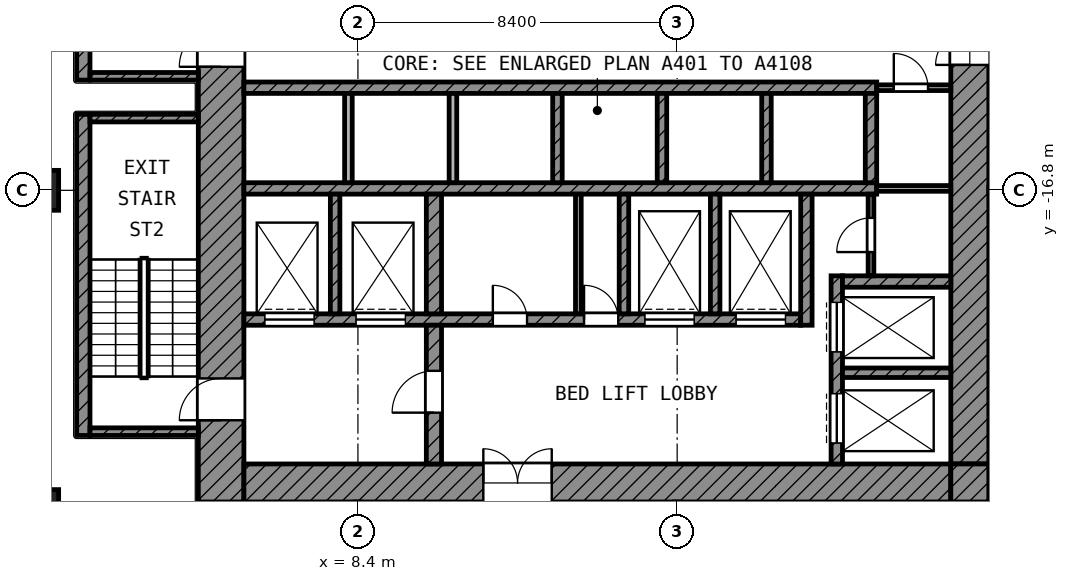
"""IFC4 building model, lengths in metres.
Left out: names, types, materials, properties, quantities, classifications, styles, units other than length and angle.
Written with IfcOpenShell. Run it as: python <this file> out.ifc"""

import sys

from ifc_helpers import new_model, si_unit, direction, frame, frame_2d, origin, origin_2d, place, context, subcontext, project, spatial, rectangle, extrude, element, fill, save


model = new_model("IFC4")
c1 = context("Model", 3, precision=1e-05, world=origin(), true_north=direction((0.0, 1.0)))
c2 = subcontext(c1, "Body", "Model", "MODEL_VIEW")
j1 = project(units=[si_unit("LENGTHUNIT", "METRE"), si_unit("PLANEANGLEUNIT", "RADIAN")], contexts=[c1])
p1 = place(None, origin())
s1 = spatial("IfcSite", under=j1, at=p1, CompositionType="ELEMENT")
p2 = place(p1, origin())
s2 = spatial("IfcBuilding", under=s1, at=p2, CompositionType="ELEMENT")
p3 = place(p2, frame((0.0, 0.0, 115.6)))
s3 = spatial("IfcBuildingStorey", under=s2, at=p3, CompositionType="ELEMENT", Elevation=115.6)
for number, where, z_axis, x_axis in (
    (1, (0.0, -16.8, 0.0), (0.0, 0.0, 1.0), (1.0, 0.0, 0.0)),
    (2, (0.0, -25.2, 0.0), (0.0, 0.0, 1.0), (1.0, 0.0, 0.0)),
):
    element("IfcColumn", number, at=place(p3, frame(where, z_axis=z_axis, x_axis=x_axis)), inside=s3, PredefinedType="COLUMN", context=c2, shape_type="SweptSolid", body=[
        extrude(rectangle(XDim=1.05, YDim=1.05, at=origin_2d()), origin(), (0.0, 0.0, 1.0), 4.2),
    ])
p4 = place(p3, frame((4.8, -25.0, 0.0), z_axis=(0.0, 0.0, 1.0), x_axis=(0.0, 1.0, 0.0)))
e3 = element("IfcWall", 3, at=p4, inside=s3, PredefinedType="SHEAR", context=c2, shape_type="SweptSolid", body=[
    extrude(rectangle(XDim=19.6, YDim=1.2, at=frame_2d((9.8, 0.0))), origin(), (0.0, 0.0, 1.0), 3.6),
])
p5 = place(p4, frame((11.45, 0.0, 0.0)))
e4 = element("IfcOpeningElement", 4, at=p5, cuts=e3, PredefinedType="OPENING", context=c2, shape_type="SweptSolid", body=[
    extrude(rectangle(XDim=1.1, YDim=2.1, at=frame_2d((0.55, 1.05))), frame((0.0, 0.61, 0.0), z_axis=(0.0, -1.0, 0.0), x_axis=(1.0, 0.0, 0.0)), (0.0, 0.0, 1.0), 1.22),
])
p6 = place(p4, frame((2.15, 0.0, 0.0)))
e5 = element("IfcOpeningElement", 5, at=p6, cuts=e3, PredefinedType="OPENING", context=c2, shape_type="SweptSolid", body=[
    extrude(rectangle(XDim=1.1, YDim=2.1, at=frame_2d((0.55, 1.05))), frame((0.0, 0.61, 0.0), z_axis=(0.0, -1.0, 0.0), x_axis=(1.0, 0.0, 0.0)), (0.0, 0.0, 1.0), 1.22),
])
p7 = place(p3, frame((24.5, -24.0, 0.0), z_axis=(0.0, 0.0, 1.0), x_axis=(0.0, 1.0, 0.0)))
e6 = element("IfcWall", 6, at=p7, inside=s3, PredefinedType="SHEAR", context=c2, shape_type="SweptSolid", body=[
    extrude(rectangle(XDim=18.6, YDim=1.0, at=frame_2d((9.3, 0.0))), origin(), (0.0, 0.0, 1.0), 3.6),
])
p8 = place(p7, frame((10.5, 0.0, 0.0)))
e7 = element("IfcOpeningElement", 7, at=p8, cuts=e6, PredefinedType="OPENING", context=c2, shape_type="SweptSolid", body=[
    extrude(rectangle(XDim=1.8, YDim=2.1, at=frame_2d((0.9, 1.05))), frame((0.0, 0.51, 0.0), z_axis=(0.0, -1.0, 0.0), x_axis=(1.0, 0.0, 0.0)), (0.0, 0.0, 1.0), 1.02),
])
p9 = place(p3, frame((5.4, -24.5, 0.0), z_axis=(0.0, 0.0, 1.0), x_axis=(1.0, 0.0, 0.0)))
e8 = element("IfcWall", 8, at=p9, inside=s3, PredefinedType="SHEAR", context=c2, shape_type="SweptSolid", body=[
    extrude(rectangle(XDim=18.6, YDim=1.0, at=frame_2d((9.3, 0.0))), origin(), (0.0, 0.0, 1.0), 3.6),
])
p10 = place(p9, frame((6.3, 0.0, 0.0)))
e9 = element("IfcOpeningElement", 9, at=p10, cuts=e8, PredefinedType="OPENING", context=c2, shape_type="SweptSolid", body=[
    extrude(rectangle(XDim=1.8, YDim=2.1, at=frame_2d((0.9, 1.05))), frame((0.0, 0.51, 0.0), z_axis=(0.0, -1.0, 0.0), x_axis=(1.0, 0.0, 0.0)), (0.0, 0.0, 1.0), 1.02),
])
p11 = place(p3, frame((24.5, -25.0, 0.0), z_axis=(0.0, 0.0, 1.0), x_axis=(0.0, 1.0, 0.0)))
e10 = element("IfcWall", 10, at=p11, inside=s3, PredefinedType="SHEAR", context=c2, shape_type="SweptSolid", body=[
    extrude(rectangle(XDim=1.0, YDim=1.0, at=frame_2d((0.5, 0.0))), origin(), (0.0, 0.0, 1.0), 3.6),
])
for number, where, z_axis, x_axis in (
    (11, (5.4, -14.1, 0.0), (0.0, 0.0, 1.0), (1.0, 0.0, 0.0)),
    (12, (5.4, -16.75, 0.0), (0.0, 0.0, 1.0), (1.0, 0.0, 0.0)),
):
    element("IfcWall", number, at=place(p3, frame(where, z_axis=z_axis, x_axis=x_axis)), inside=s3, PredefinedType="SHEAR", context=c2, shape_type="SweptSolid", body=[
        extrude(rectangle(XDim=16.65, YDim=0.3, at=frame_2d((8.325, 0.0))), origin(), (0.0, 0.0, 1.0), 3.6),
    ])
p12 = place(p3, frame((5.4, -20.2, 0.0), z_axis=(0.0, 0.0, 1.0), x_axis=(1.0, 0.0, 0.0)))
e13 = element("IfcWall", 13, at=p12, inside=s3, PredefinedType="SHEAR", context=c2, shape_type="SweptSolid", body=[
    extrude(rectangle(XDim=14.65, YDim=0.3, at=frame_2d((7.325, 0.0))), origin(), (0.0, 0.0, 1.0), 3.6),
])
p13 = place(p12, frame((10.55, 0.0, 0.0)))
e14 = element("IfcOpeningElement", 14, at=p13, cuts=e13, PredefinedType="OPENING", context=c2, shape_type="SweptSolid", body=[
    extrude(rectangle(XDim=1.3, YDim=2.1, at=frame_2d((0.65, 1.05))), frame((0.0, 0.16, 0.0), z_axis=(0.0, -1.0, 0.0), x_axis=(1.0, 0.0, 0.0)), (0.0, 0.0, 1.0), 0.32),
])
p14 = place(p12, frame((12.95, 0.0, 0.0)))
e15 = element("IfcOpeningElement", 15, at=p14, cuts=e13, PredefinedType="OPENING", context=c2, shape_type="SweptSolid", body=[
    extrude(rectangle(XDim=1.3, YDim=2.1, at=frame_2d((0.65, 1.05))), frame((0.0, 0.16, 0.0), z_axis=(0.0, -1.0, 0.0), x_axis=(1.0, 0.0, 0.0)), (0.0, 0.0, 1.0), 0.32),
])
p15 = place(p12, frame((0.55, 0.0, 0.0)))
e16 = element("IfcOpeningElement", 16, at=p15, cuts=e13, PredefinedType="OPENING", context=c2, shape_type="SweptSolid", body=[
    extrude(rectangle(XDim=1.3, YDim=2.1, at=frame_2d((0.65, 1.05))), frame((0.0, 0.16, 0.0), z_axis=(0.0, -1.0, 0.0), x_axis=(1.0, 0.0, 0.0)), (0.0, 0.0, 1.0), 0.32),
])
p16 = place(p12, frame((2.95, 0.0, 0.0)))
e17 = element("IfcOpeningElement", 17, at=p16, cuts=e13, PredefinedType="OPENING", context=c2, shape_type="SweptSolid", body=[
    extrude(rectangle(XDim=1.3, YDim=2.1, at=frame_2d((0.65, 1.05))), frame((0.0, 0.16, 0.0), z_axis=(0.0, -1.0, 0.0), x_axis=(1.0, 0.0, 0.0)), (0.0, 0.0, 1.0), 0.32),
])
p17 = place(p12, frame((6.55, 0.0, 0.0)))
e18 = element("IfcOpeningElement", 18, at=p17, cuts=e13, PredefinedType="OPENING", context=c2, shape_type="SweptSolid", body=[
    extrude(rectangle(XDim=0.9, YDim=2.1, at=frame_2d((0.45, 1.05))), frame((0.0, 0.16, 0.0), z_axis=(0.0, -1.0, 0.0), x_axis=(1.0, 0.0, 0.0)), (0.0, 0.0, 1.0), 0.32),
])
p18 = place(p12, frame((8.95, 0.0, 0.0)))
e19 = element("IfcOpeningElement", 19, at=p18, cuts=e13, PredefinedType="OPENING", context=c2, shape_type="SweptSolid", body=[
    extrude(rectangle(XDim=0.9, YDim=2.1, at=frame_2d((0.45, 1.05))), frame((0.0, 0.16, 0.0), z_axis=(0.0, -1.0, 0.0), x_axis=(1.0, 0.0, 0.0)), (0.0, 0.0, 1.0), 0.32),
])
p19 = place(p3, frame((10.4, -24.0, 0.0), z_axis=(0.0, 0.0, 1.0), x_axis=(0.0, 1.0, 0.0)))
e20 = element("IfcWall", 20, at=p19, inside=s3, PredefinedType="SHEAR", context=c2, shape_type="SweptSolid", body=[
    extrude(rectangle(XDim=3.65, YDim=0.4, at=frame_2d((1.825, 0.0))), origin(), (0.0, 0.0, 1.0), 3.6),
])
p20 = place(p19, frame((1.35, 0.0, 0.0)))
e21 = element("IfcOpeningElement", 21, at=p20, cuts=e20, PredefinedType="OPENING", context=c2, shape_type="SweptSolid", body=[
    extrude(rectangle(XDim=1.1, YDim=2.1, at=frame_2d((0.55, 1.05))), frame((0.0, 0.21, 0.0), z_axis=(0.0, -1.0, 0.0), x_axis=(1.0, 0.0, 0.0)), (0.0, 0.0, 1.0), 0.42),
])
p21 = place(p3, frame((10.4, -20.05, 0.0), z_axis=(0.0, 0.0, 1.0), x_axis=(0.0, 1.0, 0.0)))
e22 = element("IfcWall", 22, at=p21, inside=s3, PredefinedType="SHEAR", context=c2, shape_type="SweptSolid", body=[
    extrude(rectangle(XDim=3.15, YDim=0.4, at=frame_2d((1.575, 0.0))), origin(), (0.0, 0.0, 1.0), 3.6),
])
p22 = place(p3, frame((20.2, -20.35, 0.0), z_axis=(0.0, 0.0, 1.0), x_axis=(0.0, 1.0, 0.0)))
e23 = element("IfcWall", 23, at=p22, inside=s3, PredefinedType="SHEAR", context=c2, shape_type="SweptSolid", body=[
    extrude(rectangle(XDim=3.45, YDim=0.3, at=frame_2d((1.725, 0.0))), origin(), (0.0, 0.0, 1.0), 3.6),
])
p23 = place(p3, frame((21.9, -16.6, 0.0), z_axis=(0.0, 0.0, 1.0), x_axis=(0.0, 1.0, 0.0)))
e24 = element("IfcWall", 24, at=p23, inside=s3, PredefinedType="SHEAR", context=c2, shape_type="SweptSolid", body=[
    extrude(rectangle(XDim=2.35, YDim=0.3, at=frame_2d((1.175, 0.0))), origin(), (0.0, 0.0, 1.0), 3.6),
])
p24 = place(p3, frame((21.15, -19.2, 0.0), z_axis=(0.0, 0.0, 1.0), x_axis=(1.0, 0.0, 0.0)))
e25 = element("IfcWall", 25, at=p24, inside=s3, PredefinedType="SHEAR", context=c2, shape_type="SweptSolid", body=[
    extrude(rectangle(XDim=2.85, YDim=0.3, at=frame_2d((1.425, 0.0))), origin(), (0.0, 0.0, 1.0), 3.6),
])
p25 = place(p3, frame((21.0, -24.0, 0.0), z_axis=(0.0, 0.0, 1.0), x_axis=(0.0, 1.0, 0.0)))
e26 = element("IfcWall", 26, at=p25, inside=s3, PredefinedType="SHEAR", context=c2, shape_type="SweptSolid", body=[
    extrude(rectangle(XDim=4.95, YDim=0.3, at=frame_2d((2.475, 0.0))), origin(), (0.0, 0.0, 1.0), 3.6),
])
p26 = place(p25, frame((2.95, 0.0, 0.0)))
e27 = element("IfcOpeningElement", 27, at=p26, cuts=e26, PredefinedType="OPENING", context=c2, shape_type="SweptSolid", body=[
    extrude(rectangle(XDim=1.3, YDim=2.1, at=frame_2d((0.65, 1.05))), frame((0.0, 0.16, 0.0), z_axis=(0.0, -1.0, 0.0), x_axis=(1.0, 0.0, 0.0)), (0.0, 0.0, 1.0), 0.32),
])
p27 = place(p25, frame((0.55, 0.0, 0.0)))
e28 = element("IfcOpeningElement", 28, at=p27, cuts=e26, PredefinedType="OPENING", context=c2, shape_type="SweptSolid", body=[
    extrude(rectangle(XDim=1.3, YDim=2.1, at=frame_2d((0.65, 1.05))), frame((0.0, 0.16, 0.0), z_axis=(0.0, -1.0, 0.0), x_axis=(1.0, 0.0, 0.0)), (0.0, 0.0, 1.0), 0.32),
])
p28 = place(p3, frame((21.15, -21.6, 0.0), z_axis=(0.0, 0.0, 1.0), x_axis=(1.0, 0.0, 0.0)))
e29 = element("IfcWall", 29, at=p28, inside=s3, PredefinedType="SHEAR", context=c2, shape_type="SweptSolid", body=[
    extrude(rectangle(XDim=2.85, YDim=0.25, at=frame_2d((1.425, 0.0))), origin(), (0.0, 0.0, 1.0), 3.6),
])
for number, where, z_axis, x_axis in (
    (30, (7.8, -20.05, 0.0), (0.0, 0.0, 1.0), (0.0, 1.0, 0.0)),
    (31, (15.4, -20.05, 0.0), (0.0, 0.0, 1.0), (0.0, 1.0, 0.0)),
    (32, (17.8, -20.05, 0.0), (0.0, 0.0, 1.0), (0.0, 1.0, 0.0)),
):
    element("IfcWall", number, at=place(p3, frame(where, z_axis=z_axis, x_axis=x_axis)), inside=s3, PredefinedType="SHEAR", context=c2, shape_type="SweptSolid", body=[
        extrude(rectangle(XDim=3.15, YDim=0.25, at=frame_2d((1.575, 0.0))), origin(), (0.0, 0.0, 1.0), 3.6),
    ])
for number, where, z_axis, x_axis in (
    (33, (8.15, -16.6, 0.0), (0.0, 0.0, 1.0), (0.0, 1.0, 0.0)),
    (34, (10.9, -16.6, 0.0), (0.0, 0.0, 1.0), (0.0, 1.0, 0.0)),
):
    element("IfcWall", number, at=place(p3, frame(where, z_axis=z_axis, x_axis=x_axis)), inside=s3, PredefinedType="PARTITIONING", context=c2, shape_type="SweptSolid", body=[
        extrude(rectangle(XDim=2.35, YDim=0.2, at=frame_2d((1.175, 0.0))), origin(), (0.0, 0.0, 1.0), 3.6),
    ])
for number, where, z_axis, x_axis in (
    (35, (13.65, -16.6, 0.0), (0.0, 0.0, 1.0), (0.0, 1.0, 0.0)),
    (36, (16.4, -16.6, 0.0), (0.0, 0.0, 1.0), (0.0, 1.0, 0.0)),
    (37, (19.15, -16.6, 0.0), (0.0, 0.0, 1.0), (0.0, 1.0, 0.0)),
):
    element("IfcWall", number, at=place(p3, frame(where, z_axis=z_axis, x_axis=x_axis)), inside=s3, PredefinedType="SHEAR", context=c2, shape_type="SweptSolid", body=[
        extrude(rectangle(XDim=2.35, YDim=0.25, at=frame_2d((1.175, 0.0))), origin(), (0.0, 0.0, 1.0), 3.6),
    ])
p29 = place(p3, frame((21.9, -19.05, 0.0), z_axis=(0.0, 0.0, 1.0), x_axis=(0.0, 1.0, 0.0)))
e38 = element("IfcWall", 38, at=p29, inside=s3, PredefinedType="PARTITIONING", context=c2, shape_type="SweptSolid", body=[
    extrude(rectangle(XDim=2.15, YDim=0.15, at=frame_2d((1.075, 0.0))), origin(), (0.0, 0.0, 1.0), 3.6),
])
p30 = place(p29, frame((0.625, 0.0, 0.0)))
e39 = element("IfcOpeningElement", 39, at=p30, cuts=e38, PredefinedType="OPENING", context=c2, shape_type="SweptSolid", body=[
    extrude(rectangle(XDim=0.9, YDim=2.1, at=frame_2d((0.45, 1.05))), frame((0.0, 0.085, 0.0), z_axis=(0.0, -1.0, 0.0), x_axis=(1.0, 0.0, 0.0)), (0.0, 0.0, 1.0), 0.17),
])
p31 = place(p3, frame((22.05, -16.75, 0.0), z_axis=(0.0, 0.0, 1.0), x_axis=(1.0, 0.0, 0.0)))
e40 = element("IfcWall", 40, at=p31, inside=s3, PredefinedType="PARTITIONING", context=c2, shape_type="SweptSolid", body=[
    extrude(rectangle(XDim=1.95, YDim=0.15, at=frame_2d((0.975, 0.0))), origin(), (0.0, 0.0, 1.0), 3.6),
])
p32 = place(p3, frame((22.05, -14.1, 0.0), z_axis=(0.0, 0.0, 1.0), x_axis=(1.0, 0.0, 0.0)))
e41 = element("IfcWall", 41, at=p32, inside=s3, PredefinedType="PARTITIONING", context=c2, shape_type="SweptSolid", body=[
    extrude(rectangle(XDim=1.95, YDim=0.15, at=frame_2d((0.975, 0.0))), origin(), (0.0, 0.0, 1.0), 3.6),
])
p33 = place(p32, frame((0.45, 0.0, 0.0)))
e42 = element("IfcOpeningElement", 42, at=p33, cuts=e41, PredefinedType="OPENING", context=c2, shape_type="SweptSolid", body=[
    extrude(rectangle(XDim=0.9, YDim=2.1, at=frame_2d((0.45, 1.05))), frame((0.0, 0.085, 0.0), z_axis=(0.0, -1.0, 0.0), x_axis=(1.0, 0.0, 0.0)), (0.0, 0.0, 1.0), 0.17),
])
p34 = place(p3, frame((14.2, -20.05, 0.0), z_axis=(0.0, 0.0, 1.0), x_axis=(0.0, 1.0, 0.0)))
e43 = element("IfcWall", 43, at=p34, inside=s3, PredefinedType="PARTITIONING", context=c2, shape_type="SweptSolid", body=[
    extrude(rectangle(XDim=3.15, YDim=0.15, at=frame_2d((1.575, 0.0))), origin(), (0.0, 0.0, 1.0), 3.6),
])
p35 = place(p3, frame((1.175, -13.9, 0.0), z_axis=(0.0, 0.0, 1.0), x_axis=(0.0, 1.0, 0.0)))
e44 = element("IfcWall", 44, at=p35, inside=s3, PredefinedType="SHEAR", context=c2, shape_type="SweptSolid", body=[
    extrude(rectangle(XDim=8.45, YDim=0.35, at=frame_2d((4.225, 0.0))), origin(), (0.0, 0.0, 1.0), 3.6),
])
p36 = place(p3, frame((1.35, -13.8, 0.0), z_axis=(0.0, 0.0, 1.0), x_axis=(1.0, 0.0, 0.0)))
e45 = element("IfcWall", 45, at=p36, inside=s3, PredefinedType="SHEAR", context=c2, shape_type="SweptSolid", body=[
    extrude(rectangle(XDim=2.85, YDim=0.2, at=frame_2d((1.425, 0.0))), origin(), (0.0, 0.0, 1.0), 3.6),
])
p37 = place(p3, frame((1.175, -23.25, 0.0), z_axis=(0.0, 0.0, 1.0), x_axis=(0.0, 1.0, 0.0)))
e46 = element("IfcWall", 46, at=p37, inside=s3, PredefinedType="SHEAR", context=c2, shape_type="SweptSolid", body=[
    extrude(rectangle(XDim=8.45, YDim=0.35, at=frame_2d((4.225, 0.0))), origin(), (0.0, 0.0, 1.0), 3.6),
])
for number, where, z_axis, x_axis in (
    (47, (1.35, -14.9, 0.0), (0.0, 0.0, 1.0), (1.0, 0.0, 0.0)),
    (48, (1.35, -23.15, 0.0), (0.0, 0.0, 1.0), (1.0, 0.0, 0.0)),
):
    element("IfcWall", number, at=place(p3, frame(where, z_axis=z_axis, x_axis=x_axis)), inside=s3, PredefinedType="SHEAR", context=c2, shape_type="SweptSolid", body=[
        extrude(rectangle(XDim=2.85, YDim=0.2, at=frame_2d((1.425, 0.0))), origin(), (0.0, 0.0, 1.0), 3.6),
    ])
p38 = place(p3, frame((8.4, -31.782, 0.0), z_axis=(0.0, 0.0, 1.0), x_axis=(0.0, 1.0, 0.0)))
e49 = element("IfcWall", 49, at=p38, inside=s3, PredefinedType="PARTITIONING", context=c2, shape_type="SweptSolid", body=[
    extrude(rectangle(XDim=6.782, YDim=0.15, at=frame_2d((3.391, 0.0))), origin(), (0.0, 0.0, 1.0), 3.6),
])
p39 = place(p38, frame((4.182, 0.0, 0.0)))
e50 = element("IfcOpeningElement", 50, at=p39, cuts=e49, PredefinedType="OPENING", context=c2, shape_type="SweptSolid", body=[
    extrude(rectangle(XDim=0.9, YDim=2.1, at=frame_2d((0.45, 1.05))), frame((0.0, 0.085, 0.0), z_axis=(0.0, -1.0, 0.0), x_axis=(1.0, 0.0, 0.0)), (0.0, 0.0, 1.0), 0.17),
])
p40 = place(p26, origin())
e51 = element("IfcDoor", 51, at=p40, inside=s3, OperationType="DOUBLE_DOOR_SLIDING", PredefinedType="DOOR", context=c2, shape_type="SweptSolid", body=[
    extrude(rectangle(XDim=1.3, YDim=2.1, at=frame_2d((0.65, 1.05))), frame((0.0, 0.025, 0.0), z_axis=(0.0, -1.0, 0.0), x_axis=(1.0, 0.0, 0.0)), (0.0, 0.0, 1.0), 0.05),
])
fill(e27, e51)
p41 = place(p27, origin())
e52 = element("IfcDoor", 52, at=p41, inside=s3, OperationType="DOUBLE_DOOR_SLIDING", PredefinedType="DOOR", context=c2, shape_type="SweptSolid", body=[
    extrude(rectangle(XDim=1.3, YDim=2.1, at=frame_2d((0.65, 1.05))), frame((0.0, 0.025, 0.0), z_axis=(0.0, -1.0, 0.0), x_axis=(1.0, 0.0, 0.0)), (0.0, 0.0, 1.0), 0.05),
])
fill(e28, e52)
p42 = place(p13, origin())
e53 = element("IfcDoor", 53, at=p42, inside=s3, OperationType="DOUBLE_DOOR_SLIDING", PredefinedType="DOOR", context=c2, shape_type="SweptSolid", body=[
    extrude(rectangle(XDim=1.3, YDim=2.1, at=frame_2d((0.65, 1.05))), frame((0.0, 0.025, 0.0), z_axis=(0.0, -1.0, 0.0), x_axis=(1.0, 0.0, 0.0)), (0.0, 0.0, 1.0), 0.05),
])
fill(e14, e53)
p43 = place(p14, origin())
e54 = element("IfcDoor", 54, at=p43, inside=s3, OperationType="DOUBLE_DOOR_SLIDING", PredefinedType="DOOR", context=c2, shape_type="SweptSolid", body=[
    extrude(rectangle(XDim=1.3, YDim=2.1, at=frame_2d((0.65, 1.05))), frame((0.0, 0.025, 0.0), z_axis=(0.0, -1.0, 0.0), x_axis=(1.0, 0.0, 0.0)), (0.0, 0.0, 1.0), 0.05),
])
fill(e15, e54)
p44 = place(p15, origin())
e55 = element("IfcDoor", 55, at=p44, inside=s3, OperationType="DOUBLE_DOOR_SLIDING", PredefinedType="DOOR", context=c2, shape_type="SweptSolid", body=[
    extrude(rectangle(XDim=1.3, YDim=2.1, at=frame_2d((0.65, 1.05))), frame((0.0, 0.025, 0.0), z_axis=(0.0, -1.0, 0.0), x_axis=(1.0, 0.0, 0.0)), (0.0, 0.0, 1.0), 0.05),
])
fill(e16, e55)
p45 = place(p16, origin())
e56 = element("IfcDoor", 56, at=p45, inside=s3, OperationType="DOUBLE_DOOR_SLIDING", PredefinedType="DOOR", context=c2, shape_type="SweptSolid", body=[
    extrude(rectangle(XDim=1.3, YDim=2.1, at=frame_2d((0.65, 1.05))), frame((0.0, 0.025, 0.0), z_axis=(0.0, -1.0, 0.0), x_axis=(1.0, 0.0, 0.0)), (0.0, 0.0, 1.0), 0.05),
])
fill(e17, e56)
p46 = place(p5, origin())
e57 = element("IfcDoor", 57, at=p46, inside=s3, OperationType="SINGLE_SWING_LEFT", PredefinedType="DOOR", context=c2, shape_type="SweptSolid", body=[
    extrude(rectangle(XDim=1.1, YDim=2.1, at=frame_2d((0.55, 1.05))), frame((0.0, 0.025, 0.0), z_axis=(0.0, -1.0, 0.0), x_axis=(1.0, 0.0, 0.0)), (0.0, 0.0, 1.0), 0.05),
])
fill(e4, e57)
p47 = place(p6, origin())
e58 = element("IfcDoor", 58, at=p47, inside=s3, OperationType="SINGLE_SWING_LEFT", PredefinedType="DOOR", context=c2, shape_type="SweptSolid", body=[
    extrude(rectangle(XDim=1.1, YDim=2.1, at=frame_2d((0.55, 1.05))), frame((0.0, 0.025, 0.0), z_axis=(0.0, -1.0, 0.0), x_axis=(1.0, 0.0, 0.0)), (0.0, 0.0, 1.0), 0.05),
])
fill(e5, e58)
p48 = place(p20, origin())
e59 = element("IfcDoor", 59, at=p48, inside=s3, OperationType="SINGLE_SWING_LEFT", PredefinedType="DOOR", context=c2, shape_type="SweptSolid", body=[
    extrude(rectangle(XDim=1.1, YDim=2.1, at=frame_2d((0.55, 1.05))), frame((0.0, 0.025, 0.0), z_axis=(0.0, -1.0, 0.0), x_axis=(1.0, 0.0, 0.0)), (0.0, 0.0, 1.0), 0.05),
])
fill(e21, e59)
p49 = place(p8, origin())
e60 = element("IfcDoor", 60, at=p49, inside=s3, OperationType="DOUBLE_DOOR_SINGLE_SWING", PredefinedType="DOOR", context=c2, shape_type="SweptSolid", body=[
    extrude(rectangle(XDim=1.8, YDim=2.1, at=frame_2d((0.9, 1.05))), frame((0.0, 0.025, 0.0), z_axis=(0.0, -1.0, 0.0), x_axis=(1.0, 0.0, 0.0)), (0.0, 0.0, 1.0), 0.05),
])
fill(e7, e60)
p50 = place(p10, origin())
e61 = element("IfcDoor", 61, at=p50, inside=s3, OperationType="DOUBLE_DOOR_SINGLE_SWING", PredefinedType="DOOR", context=c2, shape_type="SweptSolid", body=[
    extrude(rectangle(XDim=1.8, YDim=2.1, at=frame_2d((0.9, 1.05))), frame((0.0, 0.025, 0.0), z_axis=(0.0, -1.0, 0.0), x_axis=(1.0, 0.0, 0.0)), (0.0, 0.0, 1.0), 0.05),
])
fill(e9, e61)
p51 = place(p33, origin())
e62 = element("IfcDoor", 62, at=p51, inside=s3, OperationType="SINGLE_SWING_LEFT", PredefinedType="DOOR", context=c2, shape_type="SweptSolid", body=[
    extrude(rectangle(XDim=0.9, YDim=2.1, at=frame_2d((0.45, 1.05))), frame((0.0, 0.025, 0.0), z_axis=(0.0, -1.0, 0.0), x_axis=(1.0, 0.0, 0.0)), (0.0, 0.0, 1.0), 0.05),
])
fill(e42, e62)
p52 = place(p30, origin())
e63 = element("IfcDoor", 63, at=p52, inside=s3, OperationType="SINGLE_SWING_LEFT", PredefinedType="DOOR", context=c2, shape_type="SweptSolid", body=[
    extrude(rectangle(XDim=0.9, YDim=2.1, at=frame_2d((0.45, 1.05))), frame((0.0, 0.025, 0.0), z_axis=(0.0, -1.0, 0.0), x_axis=(1.0, 0.0, 0.0)), (0.0, 0.0, 1.0), 0.05),
])
fill(e39, e63)
p53 = place(p17, origin())
e64 = element("IfcDoor", 64, at=p53, inside=s3, OperationType="SINGLE_SWING_LEFT", PredefinedType="DOOR", context=c2, shape_type="SweptSolid", body=[
    extrude(rectangle(XDim=0.9, YDim=2.1, at=frame_2d((0.45, 1.05))), frame((0.0, 0.025, 0.0), z_axis=(0.0, -1.0, 0.0), x_axis=(1.0, 0.0, 0.0)), (0.0, 0.0, 1.0), 0.05),
])
fill(e18, e64)
p54 = place(p18, origin())
e65 = element("IfcDoor", 65, at=p54, inside=s3, OperationType="SINGLE_SWING_LEFT", PredefinedType="DOOR", context=c2, shape_type="SweptSolid", body=[
    extrude(rectangle(XDim=0.9, YDim=2.1, at=frame_2d((0.45, 1.05))), frame((0.0, 0.025, 0.0), z_axis=(0.0, -1.0, 0.0), x_axis=(1.0, 0.0, 0.0)), (0.0, 0.0, 1.0), 0.05),
])
fill(e19, e65)
save(model, sys.argv[1])
